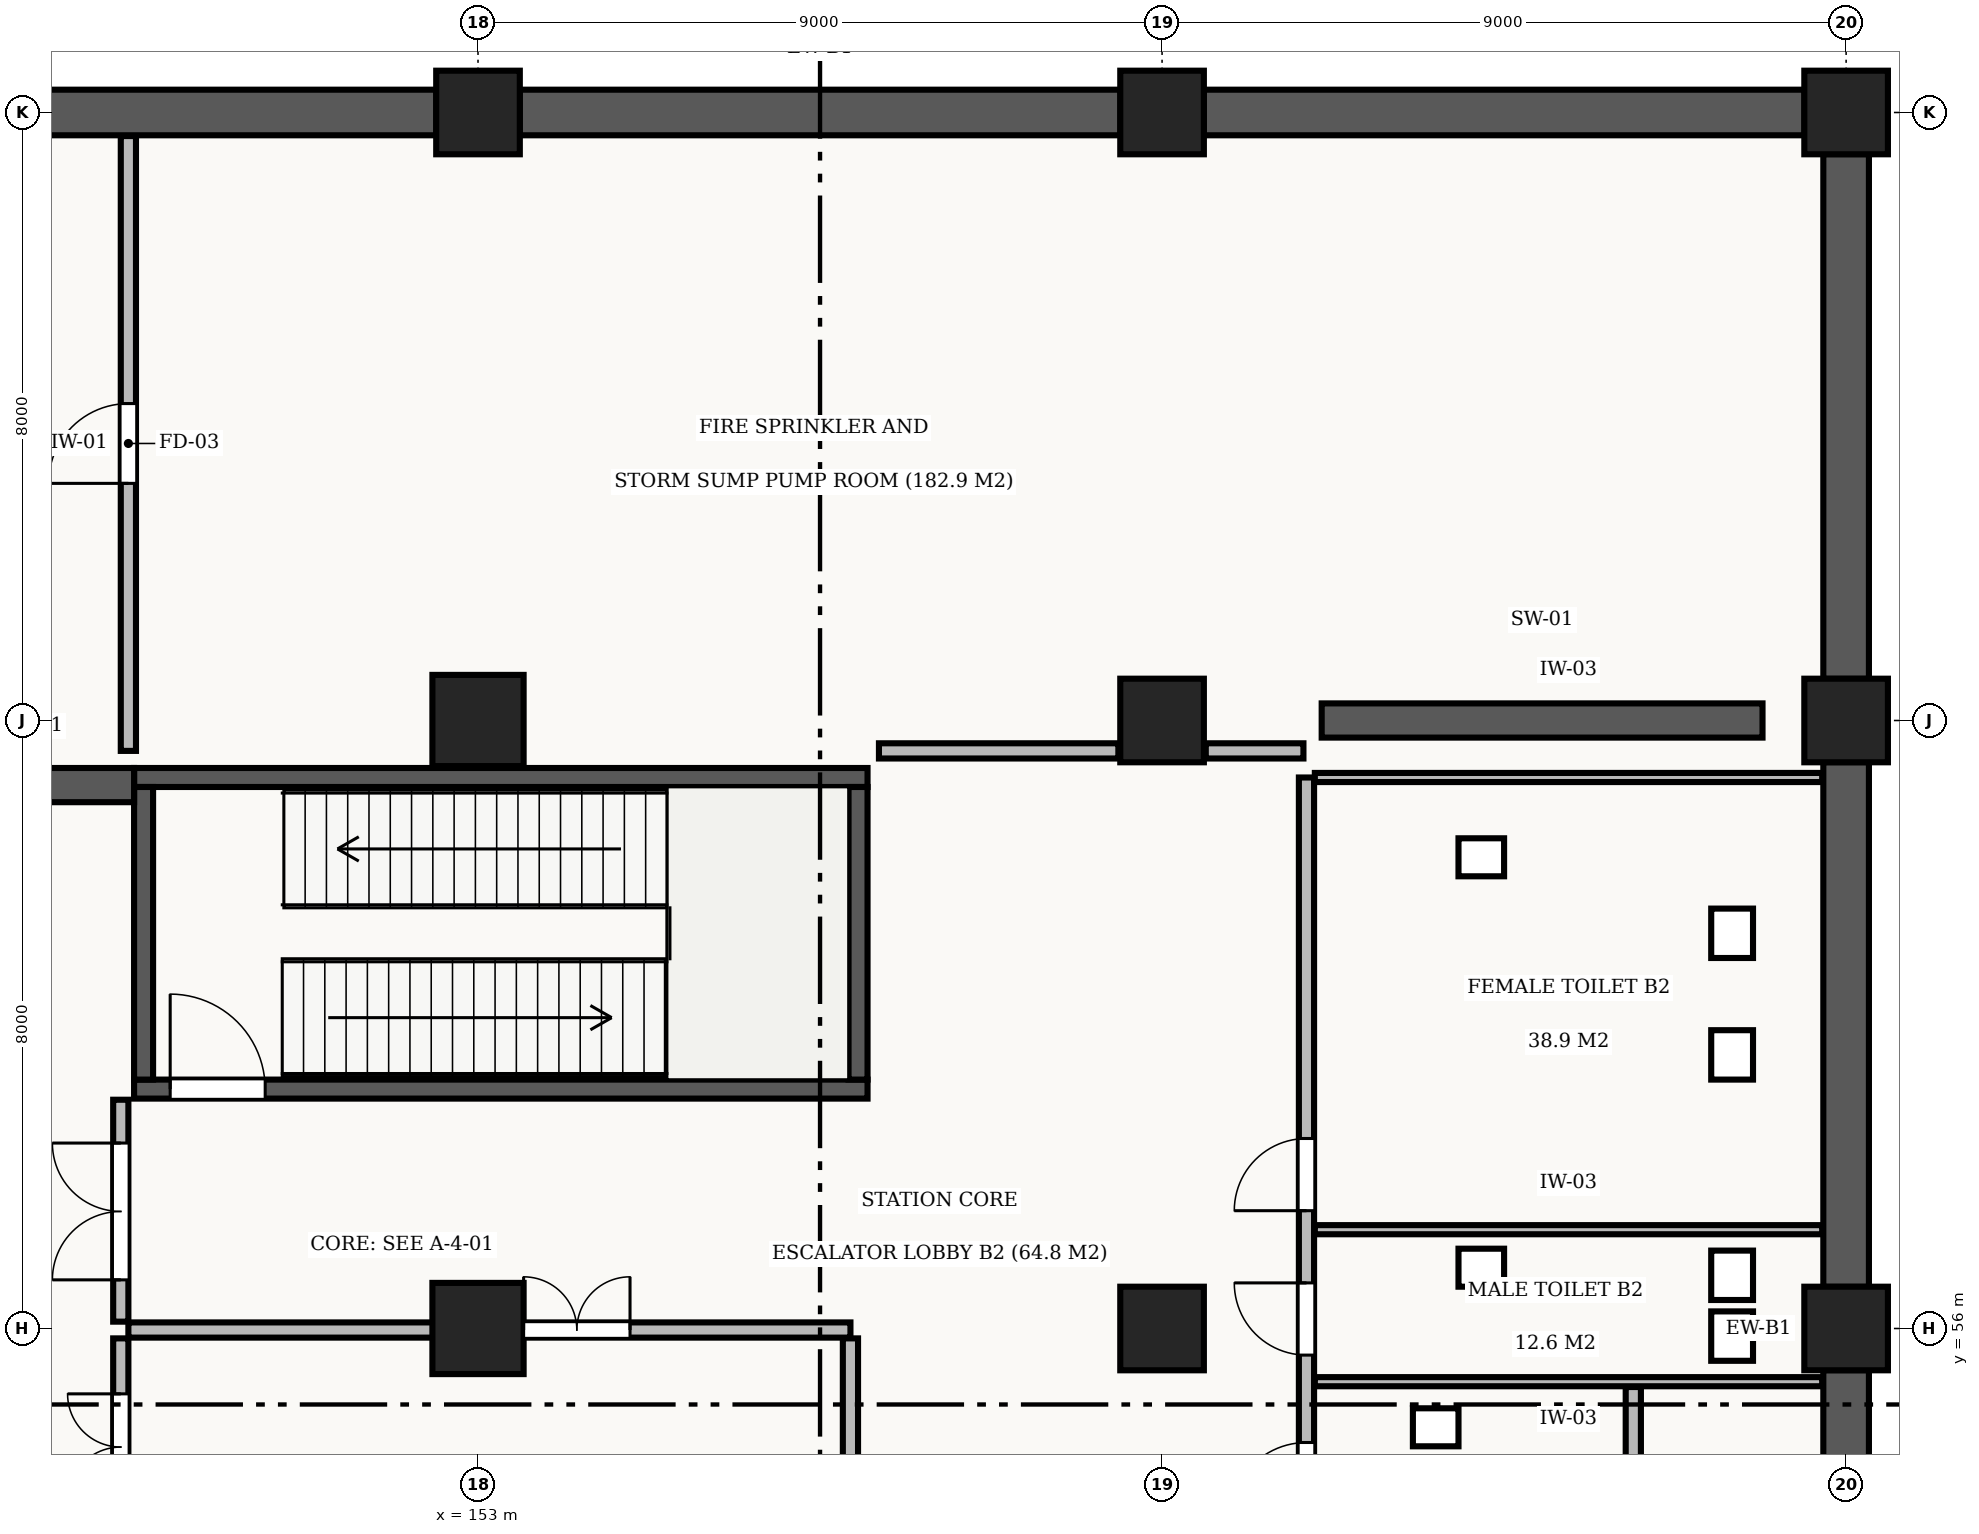
"""IFC4 building model, lengths in metres.
Left out: names, types, materials, properties, quantities, classifications, styles, units other than length and angle.
Written with IfcOpenShell. Run it as: python <this file> out.ifc"""

import sys

from ifc_helpers import new_model, si_unit, direction, frame, frame_2d, origin, origin_2d, place, context, subcontext, project, spatial, rectangle, extrude, element, fill, save


model = new_model("IFC4")
c1 = context("Model", 3, precision=1e-05, world=origin(), true_north=direction((0.0, 1.0)))
c2 = subcontext(c1, "Body", "Model", "MODEL_VIEW")
j1 = project(units=[si_unit("LENGTHUNIT", "METRE"), si_unit("PLANEANGLEUNIT", "RADIAN")], contexts=[c1])
p1 = place(None, origin())
s1 = spatial("IfcSite", under=j1, at=p1, CompositionType="ELEMENT")
p2 = place(p1, origin())
s2 = spatial("IfcBuilding", under=s1, at=p2, CompositionType="ELEMENT")
p3 = place(p2, frame((0.0, 0.0, -12.0)))
s3 = spatial("IfcBuildingStorey", under=s2, at=p3, CompositionType="ELEMENT", Elevation=-12.0)
for number, where, z_axis, x_axis in (
    (1, (153.0, 56.0, 0.0), (0.0, 0.0, 1.0), (1.0, 0.0, 0.0)),
    (2, (153.0, 64.0, 0.0), (0.0, 0.0, 1.0), (1.0, 0.0, 0.0)),
):
    element("IfcColumn", number, at=place(p3, frame(where, z_axis=z_axis, x_axis=x_axis)), inside=s3, PredefinedType="COLUMN", context=c2, shape_type="SweptSolid", body=[
        extrude(rectangle(XDim=1.2, YDim=1.2, at=origin_2d()), origin(), (0.0, 0.0, 1.0), 6.0),
    ])
for number, where, z_axis, x_axis in (
    (3, (153.0, 72.0, 0.0), (0.0, 0.0, 1.0), (1.0, 0.0, 0.0)),
    (4, (162.0, 56.0, 0.0), (0.0, 0.0, 1.0), (1.0, 0.0, 0.0)),
    (5, (162.0, 64.0, 0.0), (0.0, 0.0, 1.0), (1.0, 0.0, 0.0)),
    (6, (162.0, 72.0, 0.0), (0.0, 0.0, 1.0), (1.0, 0.0, 0.0)),
    (7, (171.0, 56.0, 0.0), (0.0, 0.0, 1.0), (1.0, 0.0, 0.0)),
    (8, (171.0, 64.0, 0.0), (0.0, 0.0, 1.0), (1.0, 0.0, 0.0)),
    (9, (171.0, 72.0, 0.0), (0.0, 0.0, 1.0), (1.0, 0.0, 0.0)),
):
    element("IfcColumn", number, at=place(p3, frame(where, z_axis=z_axis, x_axis=x_axis)), inside=s3, PredefinedType="COLUMN", context=c2, shape_type="SweptSolid", body=[
        extrude(rectangle(XDim=1.1, YDim=1.1, at=origin_2d()), origin(), (0.0, 0.0, 1.0), 6.0),
    ])
for number, where, z_axis, x_axis in (
    (10, (144.548, 72.0, 0.0), (0.0, 0.0, 1.0), (1.0, 0.0, 0.0)),
    (11, (153.548, 72.0, 0.0), (0.0, 0.0, 1.0), (1.0, 0.0, 0.0)),
    (12, (162.548, 72.0, 0.0), (0.0, 0.0, 1.0), (1.0, 0.0, 0.0)),
):
    element("IfcWall", number, at=place(p3, frame(where, z_axis=z_axis, x_axis=x_axis)), inside=s3, PredefinedType="STANDARD", context=c2, shape_type="SweptSolid", body=[
        extrude(rectangle(XDim=7.904, YDim=0.6, at=frame_2d((3.952, 0.0))), origin(), (0.0, 0.0, 1.0), 5.54),
    ])
for number, where, z_axis, x_axis in (
    (13, (171.0, 71.452, 0.0), (0.0, 0.0, 1.0), (0.0, -1.0, 0.0)),
    (14, (171.0, 63.452, 0.0), (0.0, 0.0, 1.0), (0.0, -1.0, 0.0)),
    (15, (171.0, 55.452, 0.0), (0.0, 0.0, 1.0), (0.0, -1.0, 0.0)),
):
    element("IfcWall", number, at=place(p3, frame(where, z_axis=z_axis, x_axis=x_axis)), inside=s3, PredefinedType="STANDARD", context=c2, shape_type="SweptSolid", body=[
        extrude(rectangle(XDim=6.904, YDim=0.6, at=frame_2d((3.452, 0.0))), origin(), (0.0, 0.0, 1.0), 5.54),
    ])
p4 = place(p3, frame((148.475, 59.15, 0.0), z_axis=(0.0, 0.0, 1.0), x_axis=(1.0, 0.0, 0.0)))
e16 = element("IfcWall", 16, at=p4, inside=s3, PredefinedType="SHEAR", context=c2, shape_type="SweptSolid", body=[
    extrude(rectangle(XDim=9.65, YDim=0.25, at=frame_2d((4.825, 0.0))), origin(), (0.0, 0.0, 1.0), 5.53),
])
p5 = place(p4, frame((0.475, 0.0, 0.0)))
e17 = element("IfcOpeningElement", 17, at=p5, cuts=e16, PredefinedType="OPENING", context=c2, shape_type="SweptSolid", body=[
    extrude(rectangle(XDim=1.25, YDim=2.15, at=frame_2d((0.625, 1.075))), frame((0.0, 0.137, 0.0), z_axis=(0.0, -1.0, 0.0), x_axis=(1.0, 0.0, 0.0)), (0.0, 0.0, 1.0), 0.274),
])
p6 = place(p3, frame((158.125, 63.25, 0.0), z_axis=(0.0, 0.0, 1.0), x_axis=(-1.0, 0.0, 0.0)))
e18 = element("IfcWall", 18, at=p6, inside=s3, PredefinedType="SHEAR", context=c2, shape_type="SweptSolid", body=[
    extrude(rectangle(XDim=9.65, YDim=0.25, at=frame_2d((4.825, 0.0))), origin(), (0.0, 0.0, 1.0), 5.53),
])
for number, where, z_axis, x_axis in (
    (19, (148.6, 63.125, 0.0), (0.0, 0.0, 1.0), (0.0, -1.0, 0.0)),
    (20, (158.0, 59.275, 0.0), (0.0, 0.0, 1.0), (0.0, 1.0, 0.0)),
):
    element("IfcWall", number, at=place(p3, frame(where, z_axis=z_axis, x_axis=x_axis)), inside=s3, PredefinedType="SHEAR", context=c2, shape_type="SweptSolid", body=[
        extrude(rectangle(XDim=3.85, YDim=0.25, at=frame_2d((1.925, 0.0))), origin(), (0.0, 0.0, 1.0), 5.53),
    ])
p7 = place(p3, frame((145.775, 63.15, 0.0), z_axis=(0.0, 0.0, 1.0), x_axis=(1.0, 0.0, 0.0)))
e21 = element("IfcWall", 21, at=p7, inside=s3, PredefinedType="SHEAR", context=c2, shape_type="SweptSolid", body=[
    extrude(rectangle(XDim=2.7, YDim=0.45, at=frame_2d((1.35, 0.0))), origin(), (0.0, 0.0, 1.0), 4.58),
])
p8 = place(p3, frame((164.1, 64.0, 0.0), z_axis=(0.0, 0.0, 1.0), x_axis=(1.0, 0.0, 0.0)))
e22 = element("IfcWall", 22, at=p8, inside=s3, PredefinedType="SHEAR", context=c2, shape_type="SweptSolid", body=[
    extrude(rectangle(XDim=5.8, YDim=0.45, at=frame_2d((2.9, 0.0))), origin(), (0.0, 0.0, 1.0), 4.58),
])
p9 = place(p3, frame((148.4, 55.98, 0.0), z_axis=(0.0, 0.0, 1.0), x_axis=(1.0, 0.0, 0.0)))
e23 = element("IfcWall", 23, at=p9, inside=s3, PredefinedType="STANDARD", context=c2, shape_type="SweptSolid", body=[
    extrude(rectangle(XDim=9.5, YDim=0.2, at=frame_2d((4.75, 0.0))), origin(), (0.0, 0.0, 1.0), 4.61),
])
p10 = place(p9, frame((5.2, 0.0, 0.0)))
e24 = element("IfcOpeningElement", 24, at=p10, cuts=e23, PredefinedType="OPENING", context=c2, shape_type="SweptSolid", body=[
    extrude(rectangle(XDim=1.4, YDim=2.2, at=frame_2d((0.7, 1.1))), frame((0.0, 0.112, 0.0), z_axis=(0.0, -1.0, 0.0), x_axis=(1.0, 0.0, 0.0)), (0.0, 0.0, 1.0), 0.224),
])
p11 = place(p3, frame((157.9, 52.99, 0.0), z_axis=(0.0, 0.0, 1.0), x_axis=(0.0, 1.0, 0.0)))
e25 = element("IfcWall", 25, at=p11, inside=s3, PredefinedType="STANDARD", context=c2, shape_type="SweptSolid", body=[
    extrude(rectangle(XDim=2.88, YDim=0.2, at=frame_2d((1.44, 0.0))), origin(), (0.0, 0.0, 1.0), 5.53),
])
p12 = place(p3, frame((148.3, 52.99, 0.0), z_axis=(0.0, 0.0, 1.0), x_axis=(0.0, 1.0, 0.0)))
e26 = element("IfcWall", 26, at=p12, inside=s3, PredefinedType="STANDARD", context=c2, shape_type="SweptSolid", body=[
    extrude(rectangle(XDim=2.88, YDim=0.2, at=frame_2d((1.44, 0.0))), origin(), (0.0, 0.0, 1.0), 5.53),
])
p13 = place(p12, frame((0.75, 0.0, 0.0)))
e27 = element("IfcOpeningElement", 27, at=p13, cuts=e26, PredefinedType="OPENING", context=c2, shape_type="SweptSolid", body=[
    extrude(rectangle(XDim=1.4, YDim=2.2, at=frame_2d((0.7, 1.1))), frame((0.0, 0.112, 0.0), z_axis=(0.0, -1.0, 0.0), x_axis=(1.0, 0.0, 0.0)), (0.0, 0.0, 1.0), 0.224),
])
p14 = place(p3, frame((148.3, 56.09, 0.0), z_axis=(0.0, 0.0, 1.0), x_axis=(0.0, 1.0, 0.0)))
e28 = element("IfcWall", 28, at=p14, inside=s3, PredefinedType="STANDARD", context=c2, shape_type="SweptSolid", body=[
    extrude(rectangle(XDim=2.92, YDim=0.2, at=frame_2d((1.46, 0.0))), origin(), (0.0, 0.0, 1.0), 5.53),
])
p15 = place(p14, frame((0.55, 0.0, 0.0)))
e29 = element("IfcOpeningElement", 29, at=p15, cuts=e28, PredefinedType="OPENING", context=c2, shape_type="SweptSolid", body=[
    extrude(rectangle(XDim=1.8, YDim=2.2, at=frame_2d((0.9, 1.1))), frame((0.0, 0.112, 0.0), z_axis=(0.0, -1.0, 0.0), x_axis=(1.0, 0.0, 0.0)), (0.0, 0.0, 1.0), 0.224),
])
p16 = place(p3, frame((163.9, 52.95, 0.0), z_axis=(0.0, 0.0, 1.0), x_axis=(0.0, 1.0, 0.0)))
e30 = element("IfcWall", 30, at=p16, inside=s3, PredefinedType="STANDARD", context=c2, shape_type="SweptSolid", body=[
    extrude(rectangle(XDim=10.3, YDim=0.2, at=frame_2d((5.15, 0.0))), origin(), (0.0, 0.0, 1.0), 5.53),
])
p17 = place(p16, frame((0.55, 0.0, 0.0)))
e31 = element("IfcOpeningElement", 31, at=p17, cuts=e30, PredefinedType="OPENING", context=c2, shape_type="SweptSolid", body=[
    extrude(rectangle(XDim=1.0, YDim=2.1, at=frame_2d((0.5, 1.05))), frame((0.0, 0.112, 0.0), z_axis=(0.0, -1.0, 0.0), x_axis=(1.0, 0.0, 0.0)), (0.0, 0.0, 1.0), 0.224),
])
p18 = place(p16, frame((2.7, 0.0, 0.0)))
e32 = element("IfcOpeningElement", 32, at=p18, cuts=e30, PredefinedType="OPENING", context=c2, shape_type="SweptSolid", body=[
    extrude(rectangle(XDim=0.95, YDim=2.1, at=frame_2d((0.475, 1.05))), frame((0.0, 0.112, 0.0), z_axis=(0.0, -1.0, 0.0), x_axis=(1.0, 0.0, 0.0)), (0.0, 0.0, 1.0), 0.224),
])
p19 = place(p16, frame((4.6, 0.0, 0.0)))
e33 = element("IfcOpeningElement", 33, at=p19, cuts=e30, PredefinedType="OPENING", context=c2, shape_type="SweptSolid", body=[
    extrude(rectangle(XDim=0.95, YDim=2.1, at=frame_2d((0.475, 1.05))), frame((0.0, 0.112, 0.0), z_axis=(0.0, -1.0, 0.0), x_axis=(1.0, 0.0, 0.0)), (0.0, 0.0, 1.0), 0.224),
])
p20 = place(p3, frame((168.2, 53.02, 0.0), z_axis=(0.0, 0.0, 1.0), x_axis=(0.0, 1.0, 0.0)))
e34 = element("IfcWall", 34, at=p20, inside=s3, PredefinedType="STANDARD", context=c2, shape_type="SweptSolid", body=[
    extrude(rectangle(XDim=2.21, YDim=0.2, at=frame_2d((1.105, 0.0))), origin(), (0.0, 0.0, 1.0), 5.53),
])
for number, where, z_axis, x_axis in (
    (35, (164.01, 55.3, 0.0), (0.0, 0.0, 1.0), (1.0, 0.0, 0.0)),
    (36, (164.01, 57.3, 0.0), (0.0, 0.0, 1.0), (1.0, 0.0, 0.0)),
    (37, (164.01, 63.25, 0.0), (0.0, 0.0, 1.0), (1.0, 0.0, 0.0)),
):
    element("IfcWall", number, at=place(p3, frame(where, z_axis=z_axis, x_axis=x_axis)), inside=s3, PredefinedType="STANDARD", context=c2, shape_type="SweptSolid", body=[
        extrude(rectangle(XDim=6.675, YDim=0.12, at=frame_2d((3.337, 0.0))), origin(), (0.0, 0.0, 1.0), 5.53),
    ])
p21 = place(p3, frame((158.275, 63.6, 0.0), z_axis=(0.0, 0.0, 1.0), x_axis=(1.0, 0.0, 0.0)))
e38 = element("IfcWall", 38, at=p21, inside=s3, PredefinedType="STANDARD", context=c2, shape_type="SweptSolid", body=[
    extrude(rectangle(XDim=3.15, YDim=0.2, at=frame_2d((1.575, 0.0))), origin(), (0.0, 0.0, 1.0), 5.53),
])
p22 = place(p3, frame((162.575, 63.6, 0.0), z_axis=(0.0, 0.0, 1.0), x_axis=(1.0, 0.0, 0.0)))
e39 = element("IfcWall", 39, at=p22, inside=s3, PredefinedType="STANDARD", context=c2, shape_type="SweptSolid", body=[
    extrude(rectangle(XDim=1.285, YDim=0.2, at=frame_2d((0.643, 0.0))), origin(), (0.0, 0.0, 1.0), 5.53),
])
p23 = place(p3, frame((148.4, 63.6, 0.0), z_axis=(0.0, 0.0, 1.0), x_axis=(0.0, 1.0, 0.0)))
e40 = element("IfcWall", 40, at=p23, inside=s3, PredefinedType="STANDARD", context=c2, shape_type="SweptSolid", body=[
    extrude(rectangle(XDim=8.09, YDim=0.2, at=frame_2d((4.045, 0.0))), origin(), (0.0, 0.0, 1.0), 5.53),
])
p24 = place(p23, frame((3.52, 0.0, 0.0)))
e41 = element("IfcOpeningElement", 41, at=p24, cuts=e40, PredefinedType="OPENING", context=c2, shape_type="SweptSolid", body=[
    extrude(rectangle(XDim=1.05, YDim=2.15, at=frame_2d((0.525, 1.075))), frame((0.0, 0.112, 0.0), z_axis=(0.0, -1.0, 0.0), x_axis=(1.0, 0.0, 0.0)), (0.0, 0.0, 1.0), 0.224),
])
p25 = place(p5, origin())
e42 = element("IfcDoor", 42, at=p25, inside=s3, OperationType="SINGLE_SWING_LEFT", PredefinedType="DOOR", context=c2, shape_type="SweptSolid", body=[
    extrude(rectangle(XDim=1.25, YDim=2.15, at=frame_2d((0.625, 1.075))), frame((0.0, 0.025, 0.0), z_axis=(0.0, -1.0, 0.0), x_axis=(1.0, 0.0, 0.0)), (0.0, 0.0, 1.0), 0.05),
])
fill(e17, e42)
p26 = place(p10, origin())
e43 = element("IfcDoor", 43, at=p26, inside=s3, OperationType="DOUBLE_DOOR_SINGLE_SWING", PredefinedType="DOOR", context=c2, shape_type="SweptSolid", body=[
    extrude(rectangle(XDim=1.4, YDim=2.2, at=frame_2d((0.7, 1.1))), frame((0.0, 0.025, 0.0), z_axis=(0.0, -1.0, 0.0), x_axis=(1.0, 0.0, 0.0)), (0.0, 0.0, 1.0), 0.05),
])
fill(e24, e43)
p27 = place(p13, origin())
e44 = element("IfcDoor", 44, at=p27, inside=s3, OperationType="DOUBLE_DOOR_SINGLE_SWING", PredefinedType="DOOR", context=c2, shape_type="SweptSolid", body=[
    extrude(rectangle(XDim=1.4, YDim=2.2, at=frame_2d((0.7, 1.1))), frame((0.0, 0.025, 0.0), z_axis=(0.0, -1.0, 0.0), x_axis=(1.0, 0.0, 0.0)), (0.0, 0.0, 1.0), 0.05),
])
fill(e27, e44)
p28 = place(p15, origin())
e45 = element("IfcDoor", 45, at=p28, inside=s3, OperationType="DOUBLE_DOOR_SINGLE_SWING", PredefinedType="DOOR", context=c2, shape_type="SweptSolid", body=[
    extrude(rectangle(XDim=1.8, YDim=2.2, at=frame_2d((0.9, 1.1))), frame((0.0, 0.025, 0.0), z_axis=(0.0, -1.0, 0.0), x_axis=(1.0, 0.0, 0.0)), (0.0, 0.0, 1.0), 0.05),
])
fill(e29, e45)
p29 = place(p17, origin())
e46 = element("IfcDoor", 46, at=p29, inside=s3, OperationType="SINGLE_SWING_LEFT", PredefinedType="DOOR", context=c2, shape_type="SweptSolid", body=[
    extrude(rectangle(XDim=1.0, YDim=2.1, at=frame_2d((0.5, 1.05))), frame((0.0, 0.025, 0.0), z_axis=(0.0, -1.0, 0.0), x_axis=(1.0, 0.0, 0.0)), (0.0, 0.0, 1.0), 0.05),
])
fill(e31, e46)
p30 = place(p18, origin())
e47 = element("IfcDoor", 47, at=p30, inside=s3, OperationType="SINGLE_SWING_RIGHT", PredefinedType="DOOR", context=c2, shape_type="SweptSolid", body=[
    extrude(rectangle(XDim=0.95, YDim=2.1, at=frame_2d((0.475, 1.05))), frame((0.0, 0.025, 0.0), z_axis=(0.0, -1.0, 0.0), x_axis=(1.0, 0.0, 0.0)), (0.0, 0.0, 1.0), 0.05),
])
fill(e32, e47)
p31 = place(p19, origin())
e48 = element("IfcDoor", 48, at=p31, inside=s3, OperationType="SINGLE_SWING_LEFT", PredefinedType="DOOR", context=c2, shape_type="SweptSolid", body=[
    extrude(rectangle(XDim=0.95, YDim=2.1, at=frame_2d((0.475, 1.05))), frame((0.0, 0.025, 0.0), z_axis=(0.0, -1.0, 0.0), x_axis=(1.0, 0.0, 0.0)), (0.0, 0.0, 1.0), 0.05),
])
fill(e33, e48)
p32 = place(p24, origin())
e49 = element("IfcDoor", 49, at=p32, inside=s3, OperationType="SINGLE_SWING_LEFT", PredefinedType="DOOR", context=c2, shape_type="SweptSolid", body=[
    extrude(rectangle(XDim=1.05, YDim=2.15, at=frame_2d((0.525, 1.075))), frame((0.0, 0.025, 0.0), z_axis=(0.0, -1.0, 0.0), x_axis=(1.0, 0.0, 0.0)), (0.0, 0.0, 1.0), 0.05),
])
fill(e41, e49)
save(model, sys.argv[1])
